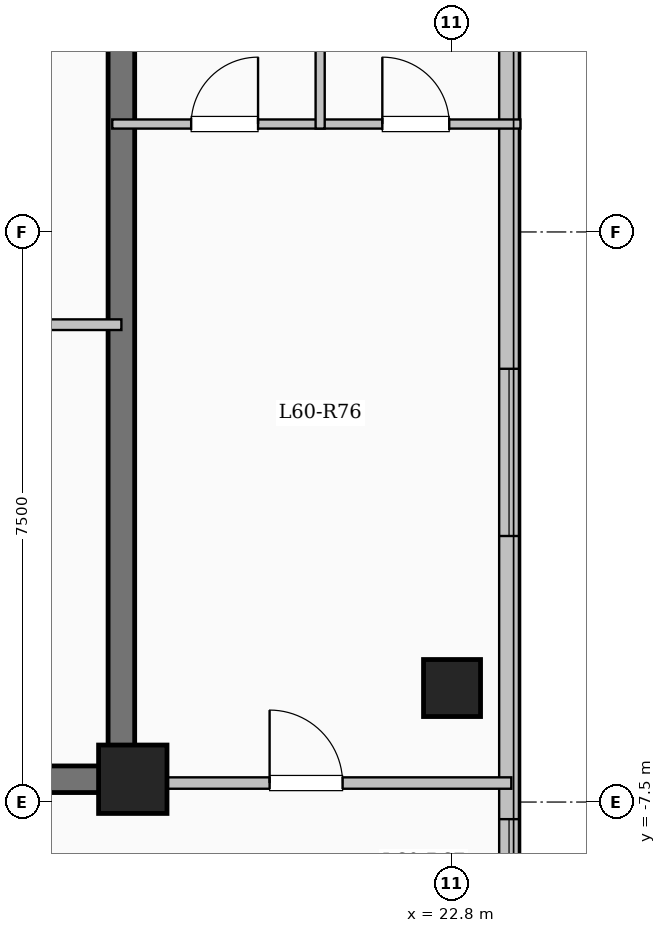
"""IFC4 building model, lengths in metres.
Left out: names, types, materials, properties, quantities, classifications, styles, units other than length and angle.
Written with IfcOpenShell. Run it as: python <this file> out.ifc"""

import sys

from ifc_helpers import new_model, si_unit, direction, frame, frame_2d, origin, origin_2d, place, context, subcontext, project, spatial, rectangle, extrude, element, fill, save


model = new_model("IFC4")
c1 = context("Model", 3, precision=1e-05, world=origin(), true_north=direction((0.0, 1.0)))
c2 = subcontext(c1, "Body", "Model", "MODEL_VIEW")
j1 = project(units=[si_unit("LENGTHUNIT", "METRE"), si_unit("PLANEANGLEUNIT", "RADIAN")], contexts=[c1])
p1 = place(None, origin())
s1 = spatial("IfcSite", under=j1, at=p1, CompositionType="ELEMENT")
p2 = place(p1, origin())
s2 = spatial("IfcBuilding", under=s1, at=p2, CompositionType="ELEMENT")
p3 = place(p2, frame((0.0, 0.0, 220.4)))
s3 = spatial("IfcBuildingStorey", under=s2, at=p3, CompositionType="ELEMENT", Elevation=220.4)
p4 = place(p3, frame((18.6, -7.2, 0.0), z_axis=(0.0, 0.0, 1.0), x_axis=(1.0, 0.0, 0.0)))
e1 = element("IfcColumn", 1, at=p4, inside=s3, PredefinedType="COLUMN", context=c2, shape_type="SweptSolid", body=[
    extrude(rectangle(XDim=0.9, YDim=0.9, at=origin_2d()), origin(), (0.0, 0.0, 1.0), 3.35),
])
p5 = place(p3, frame((22.8, -6.0, 0.0), z_axis=(0.0, 0.0, 1.0), x_axis=(1.0, 0.0, 0.0)))
e2 = element("IfcColumn", 2, at=p5, inside=s3, PredefinedType="COLUMN", context=c2, shape_type="SweptSolid", body=[
    extrude(rectangle(XDim=0.75, YDim=0.75, at=origin_2d()), origin(), (0.0, 0.0, 1.0), 3.35),
])
p6 = place(p3, frame((23.55, 17.25, 0.0), z_axis=(0.0, 0.0, 1.0), x_axis=(0.0, -1.0, 0.0)))
e3 = element("IfcWall", 3, at=p6, inside=s3, PredefinedType="SOLIDWALL", context=c2, shape_type="SweptSolid", body=[
    extrude(rectangle(XDim=34.5, YDim=0.26, at=frame_2d((17.25, 0.0))), origin(), (0.0, 0.0, 1.0), 3.1),
])
p7 = place(p6, frame((1.375, 0.0, 0.9)))
e4 = element("IfcOpeningElement", 4, at=p7, cuts=e3, PredefinedType="OPENING", context=c2, shape_type="SweptSolid", body=[
    extrude(rectangle(XDim=2.0, YDim=1.7, at=frame_2d((1.0, 0.85))), frame((0.0, 0.14, 0.0), z_axis=(0.0, -1.0, 0.0), x_axis=(1.0, 0.0, 0.0)), (0.0, 0.0, 1.0), 0.28),
])
p8 = place(p6, frame((5.125, 0.0, 0.95)))
e5 = element("IfcOpeningElement", 5, at=p8, cuts=e3, PredefinedType="OPENING", context=c2, shape_type="SweptSolid", body=[
    extrude(rectangle(XDim=1.0, YDim=1.5, at=frame_2d((0.5, 0.75))), frame((0.0, 0.14, 0.0), z_axis=(0.0, -1.0, 0.0), x_axis=(1.0, 0.0, 0.0)), (0.0, 0.0, 1.0), 0.28),
])
p9 = place(p6, frame((8.375, 0.0, 0.9)))
e6 = element("IfcOpeningElement", 6, at=p9, cuts=e3, PredefinedType="OPENING", context=c2, shape_type="SweptSolid", body=[
    extrude(rectangle(XDim=2.0, YDim=1.7, at=frame_2d((1.0, 0.85))), frame((0.0, 0.14, 0.0), z_axis=(0.0, -1.0, 0.0), x_axis=(1.0, 0.0, 0.0)), (0.0, 0.0, 1.0), 0.28),
])
p10 = place(p6, frame((13.2, 0.0, 0.9)))
e7 = element("IfcOpeningElement", 7, at=p10, cuts=e3, PredefinedType="OPENING", context=c2, shape_type="SweptSolid", body=[
    extrude(rectangle(XDim=1.65, YDim=1.6, at=frame_2d((0.825, 0.8))), frame((0.0, 0.14, 0.0), z_axis=(0.0, -1.0, 0.0), x_axis=(1.0, 0.0, 0.0)), (0.0, 0.0, 1.0), 0.28),
])
p11 = place(p6, frame((19.05, 0.0, 0.9)))
e8 = element("IfcOpeningElement", 8, at=p11, cuts=e3, PredefinedType="OPENING", context=c2, shape_type="SweptSolid", body=[
    extrude(rectangle(XDim=2.2, YDim=1.75, at=frame_2d((1.1, 0.875))), frame((0.0, 0.14, 0.0), z_axis=(0.0, -1.0, 0.0), x_axis=(1.0, 0.0, 0.0)), (0.0, 0.0, 1.0), 0.28),
])
p12 = place(p6, frame((24.975, 0.0, 0.95)))
e9 = element("IfcOpeningElement", 9, at=p12, cuts=e3, PredefinedType="OPENING", context=c2, shape_type="SweptSolid", body=[
    extrude(rectangle(XDim=1.2, YDim=1.5, at=frame_2d((0.6, 0.75))), frame((0.0, 0.14, 0.0), z_axis=(0.0, -1.0, 0.0), x_axis=(1.0, 0.0, 0.0)), (0.0, 0.0, 1.0), 0.28),
])
p13 = place(p6, frame((29.475, 0.0, 0.9)))
e10 = element("IfcOpeningElement", 10, at=p13, cuts=e3, PredefinedType="OPENING", context=c2, shape_type="SweptSolid", body=[
    extrude(rectangle(XDim=2.2, YDim=1.75, at=frame_2d((1.1, 0.875))), frame((0.0, 0.14, 0.0), z_axis=(0.0, -1.0, 0.0), x_axis=(1.0, 0.0, 0.0)), (0.0, 0.0, 1.0), 0.28),
])
p14 = place(p3, frame((18.45, -7.375, 0.0), z_axis=(0.0, 0.0, 1.0), x_axis=(0.0, 1.0, 0.0)))
e11 = element("IfcWall", 11, at=p14, inside=s3, PredefinedType="SHEAR", context=c2, shape_type="SweptSolid", body=[
    extrude(rectangle(XDim=14.05, YDim=0.35, at=frame_2d((7.025, 0.0))), origin(), (0.0, 0.0, 1.0), 3.35),
])
p15 = place(p3, frame((12.625, -7.2, 0.0), z_axis=(0.0, 0.0, 1.0), x_axis=(1.0, 0.0, 0.0)))
e12 = element("IfcWall", 12, at=p15, inside=s3, PredefinedType="SHEAR", context=c2, shape_type="SweptSolid", body=[
    extrude(rectangle(XDim=6.0, YDim=0.35, at=frame_2d((3.0, 0.0))), origin(), (0.0, 0.0, 1.0), 3.35),
])
p16 = place(p3, frame((15.4, -1.22, 0.0), z_axis=(0.0, 0.0, 1.0), x_axis=(1.0, 0.0, 0.0)))
e13 = element("IfcWall", 13, at=p16, inside=s3, PredefinedType="PARTITIONING", context=c2, shape_type="SweptSolid", body=[
    extrude(rectangle(XDim=3.05, YDim=0.14, at=frame_2d((1.525, 0.0))), origin(), (0.0, 0.0, 1.0), 3.1),
])
p17 = place(p16, frame((1.05, 0.0, 0.0)))
e14 = element("IfcOpeningElement", 14, at=p17, cuts=e13, PredefinedType="OPENING", context=c2, shape_type="SweptSolid", body=[
    extrude(rectangle(XDim=0.9, YDim=2.08, at=frame_2d((0.45, 1.04))), frame((0.0, 0.08, 0.0), z_axis=(0.0, -1.0, 0.0), x_axis=(1.0, 0.0, 0.0)), (0.0, 0.0, 1.0), 0.16),
])
p18 = place(p3, frame((18.45, -7.25, 0.0), z_axis=(0.0, 0.0, 1.0), x_axis=(1.0, 0.0, 0.0)))
e15 = element("IfcWall", 15, at=p18, inside=s3, PredefinedType="PARTITIONING", context=c2, shape_type="SweptSolid", body=[
    extrude(rectangle(XDim=5.13, YDim=0.15, at=frame_2d((2.565, 0.0))), origin(), (0.0, 0.0, 1.0), 3.1),
])
p19 = place(p18, frame((1.95, 0.0, 0.0)))
e16 = element("IfcOpeningElement", 16, at=p19, cuts=e15, PredefinedType="OPENING", context=c2, shape_type="SweptSolid", body=[
    extrude(rectangle(XDim=0.96, YDim=2.15, at=frame_2d((0.48, 1.075))), frame((0.0, 0.085, 0.0), z_axis=(0.0, -1.0, 0.0), x_axis=(1.0, 0.0, 0.0)), (0.0, 0.0, 1.0), 0.17),
])
p20 = place(p3, frame((18.33, 1.42, 0.0), z_axis=(0.0, 0.0, 1.0), x_axis=(1.0, 0.0, 0.0)))
e17 = element("IfcWall", 17, at=p20, inside=s3, PredefinedType="PARTITIONING", context=c2, shape_type="SweptSolid", body=[
    extrude(rectangle(XDim=5.37, YDim=0.12, at=frame_2d((2.685, 0.0))), origin(), (0.0, 0.0, 1.0), 3.1),
])
p21 = place(p20, frame((1.038, 0.0, 0.0)))
e18 = element("IfcOpeningElement", 18, at=p21, cuts=e17, PredefinedType="OPENING", context=c2, shape_type="SweptSolid", body=[
    extrude(rectangle(XDim=0.88, YDim=2.1, at=frame_2d((0.44, 1.05))), frame((0.0, 0.07, 0.0), z_axis=(0.0, -1.0, 0.0), x_axis=(1.0, 0.0, 0.0)), (0.0, 0.0, 1.0), 0.14),
])
p22 = place(p20, frame((3.553, 0.0, 0.0)))
e19 = element("IfcOpeningElement", 19, at=p22, cuts=e17, PredefinedType="OPENING", context=c2, shape_type="SweptSolid", body=[
    extrude(rectangle(XDim=0.88, YDim=2.1, at=frame_2d((0.44, 1.05))), frame((0.0, 0.07, 0.0), z_axis=(0.0, -1.0, 0.0), x_axis=(1.0, 0.0, 0.0)), (0.0, 0.0, 1.0), 0.14),
])
p23 = place(p3, frame((21.065, 1.36, 0.0), z_axis=(0.0, 0.0, 1.0), x_axis=(0.0, 1.0, 0.0)))
e20 = element("IfcWall", 20, at=p23, inside=s3, PredefinedType="PARTITIONING", context=c2, shape_type="SweptSolid", body=[
    extrude(rectangle(XDim=3.58, YDim=0.12, at=frame_2d((1.79, 0.0))), origin(), (0.0, 0.0, 1.0), 3.1),
])
p24 = place(p11, origin())
e21 = element("IfcWindow", 21, at=p24, inside=s3, PartitioningType="SINGLE_PANEL", PredefinedType="WINDOW", context=c2, shape_type="SweptSolid", body=[
    extrude(rectangle(XDim=2.2, YDim=1.75, at=frame_2d((1.1, 0.875))), frame((0.0, 0.03, 0.0), z_axis=(0.0, -1.0, 0.0), x_axis=(1.0, 0.0, 0.0)), (0.0, 0.0, 1.0), 0.06),
])
fill(e8, e21)
p25 = place(p12, origin())
e22 = element("IfcWindow", 22, at=p25, inside=s3, PartitioningType="SINGLE_PANEL", PredefinedType="WINDOW", context=c2, shape_type="SweptSolid", body=[
    extrude(rectangle(XDim=1.2, YDim=1.5, at=frame_2d((0.6, 0.75))), frame((0.0, 0.03, 0.0), z_axis=(0.0, -1.0, 0.0), x_axis=(1.0, 0.0, 0.0)), (0.0, 0.0, 1.0), 0.06),
])
fill(e9, e22)
p26 = place(p19, origin())
e23 = element("IfcDoor", 23, at=p26, inside=s3, OperationType="SINGLE_SWING_LEFT", PredefinedType="DOOR", context=c2, shape_type="SweptSolid", body=[
    extrude(rectangle(XDim=0.96, YDim=2.15, at=frame_2d((0.48, 1.075))), frame((0.0, 0.025, 0.0), z_axis=(0.0, -1.0, 0.0), x_axis=(1.0, 0.0, 0.0)), (0.0, 0.0, 1.0), 0.05),
])
fill(e16, e23)
p27 = place(p21, origin())
e24 = element("IfcDoor", 24, at=p27, inside=s3, OperationType="SINGLE_SWING_RIGHT", PredefinedType="DOOR", context=c2, shape_type="SweptSolid", body=[
    extrude(rectangle(XDim=0.88, YDim=2.1, at=frame_2d((0.44, 1.05))), frame((0.0, 0.025, 0.0), z_axis=(0.0, -1.0, 0.0), x_axis=(1.0, 0.0, 0.0)), (0.0, 0.0, 1.0), 0.05),
])
fill(e18, e24)
p28 = place(p22, origin())
e25 = element("IfcDoor", 25, at=p28, inside=s3, OperationType="SINGLE_SWING_LEFT", PredefinedType="DOOR", context=c2, shape_type="SweptSolid", body=[
    extrude(rectangle(XDim=0.88, YDim=2.1, at=frame_2d((0.44, 1.05))), frame((0.0, 0.025, 0.0), z_axis=(0.0, -1.0, 0.0), x_axis=(1.0, 0.0, 0.0)), (0.0, 0.0, 1.0), 0.05),
])
fill(e19, e25)
save(model, sys.argv[1])
